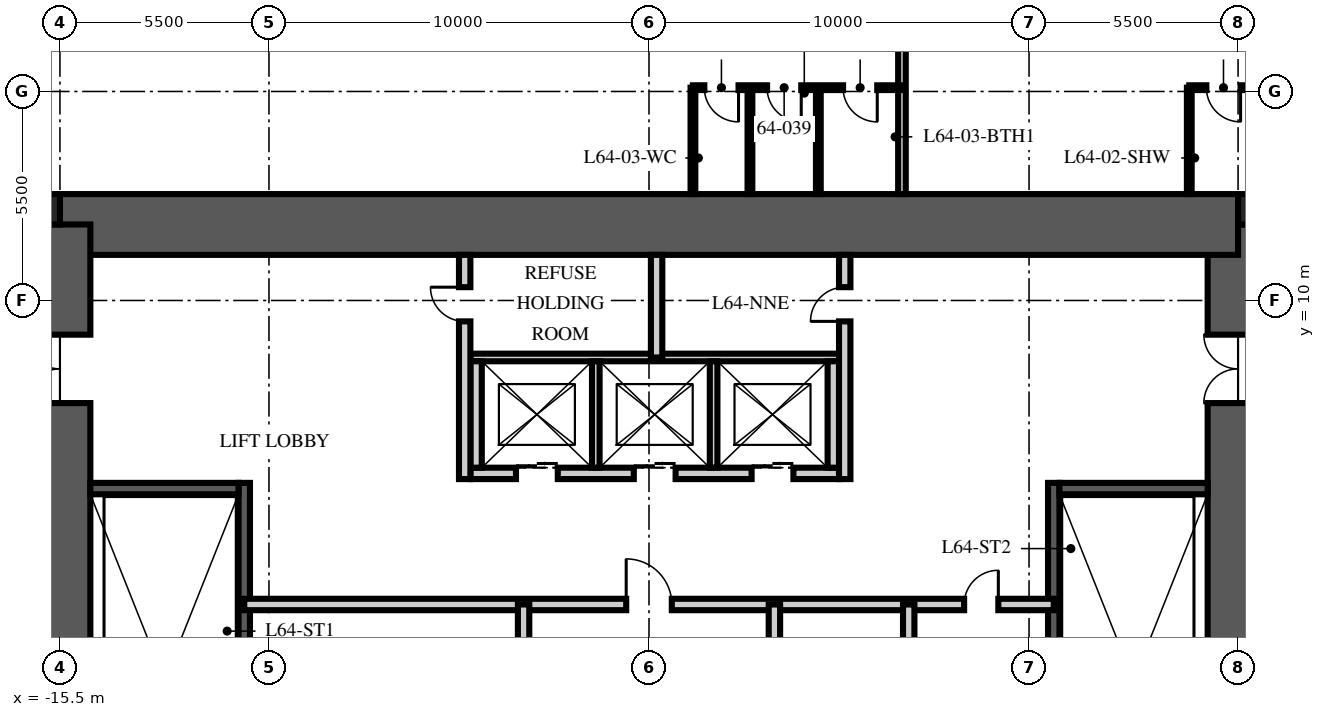
"""IFC4 building model, lengths in metres.
Left out: names, types, materials, properties, quantities, classifications, styles, units other than length and angle.
Written with IfcOpenShell. Run it as: python <this file> out.ifc"""

import sys

from ifc_helpers import new_model, si_unit, direction, frame, frame_2d, origin, origin_2d, place, context, subcontext, project, spatial, rectangle, extrude, element, fill, save


model = new_model("IFC4")
c1 = context("Model", 3, precision=1e-05, world=origin(), true_north=direction((0.0, 1.0)))
c2 = subcontext(c1, "Body", "Model", "MODEL_VIEW")
j1 = project(units=[si_unit("LENGTHUNIT", "METRE"), si_unit("PLANEANGLEUNIT", "RADIAN")], contexts=[c1])
p1 = place(None, origin())
s1 = spatial("IfcSite", under=j1, at=p1, CompositionType="ELEMENT")
p2 = place(p1, origin())
s2 = spatial("IfcBuilding", under=s1, at=p2, CompositionType="ELEMENT")
p3 = place(p2, frame((0.0, 0.0, 255.75)))
s3 = spatial("IfcBuildingStorey", under=s2, at=p3, CompositionType="ELEMENT", Elevation=255.75)
p4 = place(p3, frame((15.5, -12.0, -0.25), z_axis=(0.0, 0.0, 1.0), x_axis=(0.0, 1.0, 0.0)))
e1 = element("IfcWall", 1, at=p4, inside=s3, PredefinedType="SHEAR", context=c2, shape_type="SweptSolid", body=[
    extrude(rectangle(XDim=24.0, YDim=1.6, at=frame_2d((12.0, 0.0))), origin(), (0.0, 0.0, 1.0), 3.75),
])
p5 = place(p4, frame((3.2, 0.0, 0.25)))
e2 = element("IfcOpeningElement", 2, at=p5, cuts=e1, PredefinedType="OPENING", context=c2, shape_type="SweptSolid", body=[
    extrude(rectangle(XDim=1.2, YDim=2.1, at=frame_2d((0.6, 1.05))), frame((0.0, 0.81, 0.0), z_axis=(0.0, -1.0, 0.0), x_axis=(1.0, 0.0, 0.0)), (0.0, 0.0, 1.0), 1.62),
])
p6 = place(p4, frame((19.3, 0.0, 0.25)))
e3 = element("IfcOpeningElement", 3, at=p6, cuts=e1, PredefinedType="OPENING", context=c2, shape_type="SweptSolid", body=[
    extrude(rectangle(XDim=1.8, YDim=2.1, at=frame_2d((0.9, 1.05))), frame((0.0, 0.81, 0.0), z_axis=(0.0, -1.0, 0.0), x_axis=(1.0, 0.0, 0.0)), (0.0, 0.0, 1.0), 1.62),
])
p7 = place(p3, frame((-15.5, 12.0, -0.25), z_axis=(0.0, 0.0, 1.0), x_axis=(1.0, 0.0, 0.0)))
e4 = element("IfcWall", 4, at=p7, inside=s3, PredefinedType="SHEAR", context=c2, shape_type="SweptSolid", body=[
    extrude(rectangle(XDim=31.0, YDim=1.6, at=frame_2d((15.5, 0.0))), origin(), (0.0, 0.0, 1.0), 3.75),
])
p8 = place(p3, frame((-15.5, -12.0, -0.25), z_axis=(0.0, 0.0, 1.0), x_axis=(0.0, 1.0, 0.0)))
e5 = element("IfcWall", 5, at=p8, inside=s3, PredefinedType="SHEAR", context=c2, shape_type="SweptSolid", body=[
    extrude(rectangle(XDim=24.0, YDim=1.6, at=frame_2d((12.0, 0.0))), origin(), (0.0, 0.0, 1.0), 3.75),
])
p9 = place(p8, frame((3.2, 0.0, 0.25)))
e6 = element("IfcOpeningElement", 6, at=p9, cuts=e5, PredefinedType="OPENING", context=c2, shape_type="SweptSolid", body=[
    extrude(rectangle(XDim=1.2, YDim=2.1, at=frame_2d((0.6, 1.05))), frame((0.0, 0.81, 0.0), z_axis=(0.0, -1.0, 0.0), x_axis=(1.0, 0.0, 0.0)), (0.0, 0.0, 1.0), 1.62),
])
p10 = place(p8, frame((19.3, 0.0, 0.25)))
e7 = element("IfcOpeningElement", 7, at=p10, cuts=e5, PredefinedType="OPENING", context=c2, shape_type="SweptSolid", body=[
    extrude(rectangle(XDim=1.8, YDim=2.1, at=frame_2d((0.9, 1.05))), frame((0.0, 0.81, 0.0), z_axis=(0.0, -1.0, 0.0), x_axis=(1.0, 0.0, 0.0)), (0.0, 0.0, 1.0), 1.62),
])
for number, where, z_axis, x_axis in (
    (8, (15.9, 12.4, -0.25), (0.0, 0.0, 1.0), (1.0, 0.0, 0.0)),
    (9, (-15.9, 12.4, -0.25), (0.0, 0.0, 1.0), (1.0, 0.0, 0.0)),
):
    element("IfcColumn", number, at=place(p3, frame(where, z_axis=z_axis, x_axis=x_axis)), inside=s3, PredefinedType="COLUMN", context=c2, shape_type="SweptSolid", body=[
        extrude(rectangle(XDim=0.8, YDim=0.8, at=origin_2d()), origin(), (0.0, 0.0, 1.0), 3.75),
    ])
p11 = place(p3, frame((-10.65, -4.9, 0.0), z_axis=(0.0, 0.0, 1.0), x_axis=(0.0, 1.0, 0.0)))
e10 = element("IfcWall", 10, at=p11, inside=s3, PredefinedType="SOLIDWALL", context=c2, shape_type="SweptSolid", body=[
    extrude(rectangle(XDim=10.1, YDim=0.3, at=frame_2d((5.05, 0.0))), origin(), (0.0, 0.0, 1.0), 3.5),
])
p12 = place(p3, frame((-14.7, 5.05, 0.0), z_axis=(0.0, 0.0, 1.0), x_axis=(1.0, 0.0, 0.0)))
e11 = element("IfcWall", 11, at=p12, inside=s3, PredefinedType="SOLIDWALL", context=c2, shape_type="SweptSolid", body=[
    extrude(rectangle(XDim=3.9, YDim=0.3, at=frame_2d((1.95, 0.0))), origin(), (0.0, 0.0, 1.0), 3.5),
])
p13 = place(p3, frame((10.65, -4.9, 0.0), z_axis=(0.0, 0.0, 1.0), x_axis=(0.0, 1.0, 0.0)))
e12 = element("IfcWall", 12, at=p13, inside=s3, PredefinedType="SOLIDWALL", context=c2, shape_type="SweptSolid", body=[
    extrude(rectangle(XDim=10.1, YDim=0.3, at=frame_2d((5.05, 0.0))), origin(), (0.0, 0.0, 1.0), 3.5),
])
p14 = place(p3, frame((14.7, 5.05, 0.0), z_axis=(0.0, 0.0, 1.0), x_axis=(-1.0, 0.0, 0.0)))
e13 = element("IfcWall", 13, at=p14, inside=s3, PredefinedType="SOLIDWALL", context=c2, shape_type="SweptSolid", body=[
    extrude(rectangle(XDim=3.9, YDim=0.3, at=frame_2d((1.95, 0.0))), origin(), (0.0, 0.0, 1.0), 3.5),
])
p15 = place(p3, frame((-4.7, 5.45, 0.0), z_axis=(0.0, 0.0, 1.0), x_axis=(1.0, 0.0, 0.0)))
e14 = element("IfcWall", 14, at=p15, inside=s3, PredefinedType="PARTITIONING", context=c2, shape_type="SweptSolid", body=[
    extrude(rectangle(XDim=9.7, YDim=0.3, at=frame_2d((4.85, 0.0))), origin(), (0.0, 0.0, 1.0), 3.5),
])
p16 = place(p15, frame((1.2, 0.0, 0.0)))
e15 = element("IfcOpeningElement", 15, at=p16, cuts=e14, PredefinedType="OPENING", context=c2, shape_type="SweptSolid", body=[
    extrude(rectangle(XDim=1.1, YDim=2.1, at=frame_2d((0.55, 1.05))), frame((0.0, 0.16, 0.0), z_axis=(0.0, -1.0, 0.0), x_axis=(1.0, 0.0, 0.0)), (0.0, 0.0, 1.0), 0.32),
])
p17 = place(p15, frame((4.3, 0.0, 0.0)))
e16 = element("IfcOpeningElement", 16, at=p17, cuts=e14, PredefinedType="OPENING", context=c2, shape_type="SweptSolid", body=[
    extrude(rectangle(XDim=1.1, YDim=2.1, at=frame_2d((0.55, 1.05))), frame((0.0, 0.16, 0.0), z_axis=(0.0, -1.0, 0.0), x_axis=(1.0, 0.0, 0.0)), (0.0, 0.0, 1.0), 0.32),
])
p18 = place(p15, frame((7.4, 0.0, 0.0)))
e17 = element("IfcOpeningElement", 17, at=p18, cuts=e14, PredefinedType="OPENING", context=c2, shape_type="SweptSolid", body=[
    extrude(rectangle(XDim=1.1, YDim=2.1, at=frame_2d((0.55, 1.05))), frame((0.0, 0.16, 0.0), z_axis=(0.0, -1.0, 0.0), x_axis=(1.0, 0.0, 0.0)), (0.0, 0.0, 1.0), 0.32),
])
p19 = place(p3, frame((-4.7, 8.5, 0.0), z_axis=(0.0, 0.0, 1.0), x_axis=(1.0, 0.0, 0.0)))
e18 = element("IfcWall", 18, at=p19, inside=s3, PredefinedType="PARTITIONING", context=c2, shape_type="SweptSolid", body=[
    extrude(rectangle(XDim=9.7, YDim=0.2, at=frame_2d((4.85, 0.0))), origin(), (0.0, 0.0, 1.0), 3.5),
])
for number, where, z_axis, x_axis in (
    (19, (-4.55, 5.6, 0.0), (0.0, 0.0, 1.0), (0.0, 1.0, 0.0)),
    (20, (4.85, 5.6, 0.0), (0.0, 0.0, 1.0), (0.0, 1.0, 0.0)),
):
    element("IfcWall", number, at=place(p3, frame(where, z_axis=z_axis, x_axis=x_axis)), inside=s3, PredefinedType="PARTITIONING", context=c2, shape_type="SweptSolid", body=[
        extrude(rectangle(XDim=2.8, YDim=0.3, at=frame_2d((1.4, 0.0))), origin(), (0.0, 0.0, 1.0), 3.5),
    ])
for number, where, z_axis, x_axis in (
    (21, (-1.4, 5.6, 0.0), (0.0, 0.0, 1.0), (0.0, 1.0, 0.0)),
    (22, (1.7, 5.6, 0.0), (0.0, 0.0, 1.0), (0.0, 1.0, 0.0)),
):
    element("IfcWall", number, at=place(p3, frame(where, z_axis=z_axis, x_axis=x_axis)), inside=s3, PredefinedType="PARTITIONING", context=c2, shape_type="SweptSolid", body=[
        extrude(rectangle(XDim=2.8, YDim=0.2, at=frame_2d((1.4, 0.0))), origin(), (0.0, 0.0, 1.0), 3.5),
    ])
p20 = place(p3, frame((-10.65, 2.0, 0.0), z_axis=(0.0, 0.0, 1.0), x_axis=(1.0, 0.0, 0.0)))
e23 = element("IfcWall", 23, at=p20, inside=s3, PredefinedType="PARTITIONING", context=c2, shape_type="SweptSolid", body=[
    extrude(rectangle(XDim=21.3, YDim=0.3, at=frame_2d((10.65, 0.0))), origin(), (0.0, 0.0, 1.0), 3.5),
])
p21 = place(p20, frame((10.05, 0.0, 0.0)))
e24 = element("IfcOpeningElement", 24, at=p21, cuts=e23, PredefinedType="OPENING", context=c2, shape_type="SweptSolid", body=[
    extrude(rectangle(XDim=1.2, YDim=2.1, at=frame_2d((0.6, 1.05))), frame((0.0, 0.16, 0.0), z_axis=(0.0, -1.0, 0.0), x_axis=(1.0, 0.0, 0.0)), (0.0, 0.0, 1.0), 0.32),
])
p22 = place(p20, frame((18.942, 0.0, 0.0)))
e25 = element("IfcOpeningElement", 25, at=p22, cuts=e23, PredefinedType="OPENING", context=c2, shape_type="SweptSolid", body=[
    extrude(rectangle(XDim=0.9, YDim=2.1, at=frame_2d((0.45, 1.05))), frame((0.0, 0.16, 0.0), z_axis=(0.0, -1.0, 0.0), x_axis=(1.0, 0.0, 0.0)), (0.0, 0.0, 1.0), 0.32),
])
p23 = place(p3, frame((-3.3, -6.65, 0.0), z_axis=(0.0, 0.0, 1.0), x_axis=(0.0, 1.0, 0.0)))
e26 = element("IfcWall", 26, at=p23, inside=s3, PredefinedType="PARTITIONING", context=c2, shape_type="SweptSolid", body=[
    extrude(rectangle(XDim=8.65, YDim=0.3, at=frame_2d((4.325, 0.0))), origin(), (0.0, 0.0, 1.0), 3.5),
])
p24 = place(p23, frame((1.75, 0.0, 0.0)))
e27 = element("IfcOpeningElement", 27, at=p24, cuts=e26, PredefinedType="OPENING", context=c2, shape_type="SweptSolid", body=[
    extrude(rectangle(XDim=0.9, YDim=2.1, at=frame_2d((0.45, 1.05))), frame((0.0, 0.16, 0.0), z_axis=(0.0, -1.0, 0.0), x_axis=(1.0, 0.0, 0.0)), (0.0, 0.0, 1.0), 0.32),
])
p25 = place(p23, frame((6.075, 0.0, 0.0)))
e28 = element("IfcOpeningElement", 28, at=p25, cuts=e26, PredefinedType="OPENING", context=c2, shape_type="SweptSolid", body=[
    extrude(rectangle(XDim=0.9, YDim=2.1, at=frame_2d((0.45, 1.05))), frame((0.0, 0.16, 0.0), z_axis=(0.0, -1.0, 0.0), x_axis=(1.0, 0.0, 0.0)), (0.0, 0.0, 1.0), 0.32),
])
p26 = place(p3, frame((3.3, -6.65, 0.0), z_axis=(0.0, 0.0, 1.0), x_axis=(0.0, 1.0, 0.0)))
e29 = element("IfcWall", 29, at=p26, inside=s3, PredefinedType="PARTITIONING", context=c2, shape_type="SweptSolid", body=[
    extrude(rectangle(XDim=8.65, YDim=0.3, at=frame_2d((4.325, 0.0))), origin(), (0.0, 0.0, 1.0), 3.5),
])
p27 = place(p26, frame((3.875, 0.0, 0.0)))
e30 = element("IfcOpeningElement", 30, at=p27, cuts=e29, PredefinedType="OPENING", context=c2, shape_type="SweptSolid", body=[
    extrude(rectangle(XDim=0.9, YDim=2.1, at=frame_2d((0.45, 1.05))), frame((0.0, 0.16, 0.0), z_axis=(0.0, -1.0, 0.0), x_axis=(1.0, 0.0, 0.0)), (0.0, 0.0, 1.0), 0.32),
])
p28 = place(p3, frame((6.834, -6.65, 0.0), z_axis=(0.0, 0.0, 1.0), x_axis=(0.0, 1.0, 0.0)))
e31 = element("IfcWall", 31, at=p28, inside=s3, PredefinedType="PARTITIONING", context=c2, shape_type="SweptSolid", body=[
    extrude(rectangle(XDim=8.65, YDim=0.3, at=frame_2d((4.325, 0.0))), origin(), (0.0, 0.0, 1.0), 3.5),
])
p29 = place(p3, frame((-4.85, 5.3, 0.0), z_axis=(0.0, 0.0, 1.0), x_axis=(0.0, 1.0, 0.0)))
e32 = element("IfcWall", 32, at=p29, inside=s3, PredefinedType="PARTITIONING", context=c2, shape_type="SweptSolid", body=[
    extrude(rectangle(XDim=5.9, YDim=0.3, at=frame_2d((2.95, 0.0))), origin(), (0.0, 0.0, 1.0), 3.5),
])
p30 = place(p29, frame((4.15, 0.0, 0.0)))
e33 = element("IfcOpeningElement", 33, at=p30, cuts=e32, PredefinedType="OPENING", context=c2, shape_type="SweptSolid", body=[
    extrude(rectangle(XDim=0.9, YDim=2.1, at=frame_2d((0.45, 1.05))), frame((0.0, 0.16, 0.0), z_axis=(0.0, -1.0, 0.0), x_axis=(1.0, 0.0, 0.0)), (0.0, 0.0, 1.0), 0.32),
])
p31 = place(p3, frame((5.15, 5.3, 0.0), z_axis=(0.0, 0.0, 1.0), x_axis=(0.0, 1.0, 0.0)))
e34 = element("IfcWall", 34, at=p31, inside=s3, PredefinedType="PARTITIONING", context=c2, shape_type="SweptSolid", body=[
    extrude(rectangle(XDim=5.9, YDim=0.3, at=frame_2d((2.95, 0.0))), origin(), (0.0, 0.0, 1.0), 3.5),
])
p32 = place(p31, frame((4.15, 0.0, 0.0)))
e35 = element("IfcOpeningElement", 35, at=p32, cuts=e34, PredefinedType="OPENING", context=c2, shape_type="SweptSolid", body=[
    extrude(rectangle(XDim=0.9, YDim=2.1, at=frame_2d((0.45, 1.05))), frame((0.0, 0.16, 0.0), z_axis=(0.0, -1.0, 0.0), x_axis=(1.0, 0.0, 0.0)), (0.0, 0.0, 1.0), 0.32),
])
p33 = place(p3, frame((0.2, 8.5, 0.0), z_axis=(0.0, 0.0, 1.0), x_axis=(0.0, 1.0, 0.0)))
e36 = element("IfcWall", 36, at=p33, inside=s3, PredefinedType="PARTITIONING", context=c2, shape_type="SweptSolid", body=[
    extrude(rectangle(XDim=2.7, YDim=0.3, at=frame_2d((1.35, 0.0))), origin(), (0.0, 0.0, 1.0), 3.5),
])
p34 = place(p3, frame((6.656, 12.8, 0.0), z_axis=(0.0, 0.0, 1.0), x_axis=(0.0, 1.0, 0.0)))
e37 = element("IfcWall", 37, at=p34, inside=s3, PredefinedType="PARTITIONING", context=c2, shape_type="SweptSolid", body=[
    extrude(rectangle(XDim=12.9, YDim=0.2, at=frame_2d((6.45, 0.0))), origin(), (0.0, 0.0, 1.0), 2.91),
])
p35 = place(p3, frame((16.017, 15.6, 0.0), z_axis=(0.0, 0.0, 1.0), x_axis=(-1.0, 0.0, 0.0)))
e38 = element("IfcWall", 38, at=p35, inside=s3, PredefinedType="PARTITIONING", context=c2, shape_type="SweptSolid", body=[
    extrude(rectangle(XDim=1.8, YDim=0.125, at=frame_2d((0.9, 0.0))), origin(), (0.0, 0.0, 1.0), 3.5),
])
p36 = place(p35, frame((0.45, 0.0, 0.0)))
e39 = element("IfcOpeningElement", 39, at=p36, cuts=e38, PredefinedType="OPENING", context=c2, shape_type="SweptSolid", body=[
    extrude(rectangle(XDim=0.9, YDim=2.1, at=frame_2d((0.45, 1.05))), frame((0.0, 0.073, 0.0), z_axis=(0.0, -1.0, 0.0), x_axis=(1.0, 0.0, 0.0)), (0.0, 0.0, 1.0), 0.145),
])
p37 = place(p3, frame((14.217, 12.8, 0.0), z_axis=(0.0, 0.0, 1.0), x_axis=(0.0, 1.0, 0.0)))
e40 = element("IfcWall", 40, at=p37, inside=s3, PredefinedType="PARTITIONING", context=c2, shape_type="SweptSolid", body=[
    extrude(rectangle(XDim=2.8, YDim=0.125, at=frame_2d((1.4, 0.0))), origin(), (0.0, 0.0, 1.0), 3.5),
])
p38 = place(p3, frame((6.656, 15.6, 0.0), z_axis=(0.0, 0.0, 1.0), x_axis=(-1.0, 0.0, 0.0)))
e41 = element("IfcWall", 41, at=p38, inside=s3, PredefinedType="PARTITIONING", context=c2, shape_type="SweptSolid", body=[
    extrude(rectangle(XDim=5.5, YDim=0.125, at=frame_2d((2.75, 0.0))), origin(), (0.0, 0.0, 1.0), 2.81),
])
p39 = place(p38, frame((0.65, 0.0, 0.0)))
e42 = element("IfcOpeningElement", 42, at=p39, cuts=e41, PredefinedType="OPENING", context=c2, shape_type="SweptSolid", body=[
    extrude(rectangle(XDim=0.9, YDim=2.1, at=frame_2d((0.45, 1.05))), frame((0.0, 0.073, 0.0), z_axis=(0.0, -1.0, 0.0), x_axis=(1.0, 0.0, 0.0)), (0.0, 0.0, 1.0), 0.145),
])
p40 = place(p38, frame((2.65, 0.0, 0.0)))
e43 = element("IfcOpeningElement", 43, at=p40, cuts=e41, PredefinedType="OPENING", context=c2, shape_type="SweptSolid", body=[
    extrude(rectangle(XDim=0.9, YDim=2.1, at=frame_2d((0.45, 1.05))), frame((0.0, 0.073, 0.0), z_axis=(0.0, -1.0, 0.0), x_axis=(1.0, 0.0, 0.0)), (0.0, 0.0, 1.0), 0.145),
])
p41 = place(p38, frame((4.3, 0.0, 0.0)))
e44 = element("IfcOpeningElement", 44, at=p41, cuts=e41, PredefinedType="OPENING", context=c2, shape_type="SweptSolid", body=[
    extrude(rectangle(XDim=0.9, YDim=2.1, at=frame_2d((0.45, 1.05))), frame((0.0, 0.073, 0.0), z_axis=(0.0, -1.0, 0.0), x_axis=(1.0, 0.0, 0.0)), (0.0, 0.0, 1.0), 0.145),
])
for number, where, z_axis, x_axis in (
    (45, (4.456, 12.8, 0.0), (0.0, 0.0, 1.0), (0.0, 1.0, 0.0)),
    (46, (2.656, 12.8, 0.0), (0.0, 0.0, 1.0), (0.0, 1.0, 0.0)),
    (47, (1.156, 12.8, 0.0), (0.0, 0.0, 1.0), (0.0, 1.0, 0.0)),
):
    element("IfcWall", number, at=place(p3, frame(where, z_axis=z_axis, x_axis=x_axis)), inside=s3, PredefinedType="PARTITIONING", context=c2, shape_type="SweptSolid", body=[
        extrude(rectangle(XDim=2.8, YDim=0.125, at=frame_2d((1.4, 0.0))), origin(), (0.0, 0.0, 1.0), 3.5),
    ])
p42 = place(p10, origin())
e48 = element("IfcDoor", 48, at=p42, inside=s3, OperationType="DOUBLE_DOOR_SINGLE_SWING", PredefinedType="DOOR", context=c2, shape_type="SweptSolid", body=[
    extrude(rectangle(XDim=1.8, YDim=2.1, at=frame_2d((0.9, 1.05))), frame((0.0, 0.025, 0.0), z_axis=(0.0, -1.0, 0.0), x_axis=(1.0, 0.0, 0.0)), (0.0, 0.0, 1.0), 0.05),
])
fill(e7, e48)
p43 = place(p6, origin())
e49 = element("IfcDoor", 49, at=p43, inside=s3, OperationType="DOUBLE_DOOR_SINGLE_SWING", PredefinedType="DOOR", context=c2, shape_type="SweptSolid", body=[
    extrude(rectangle(XDim=1.8, YDim=2.1, at=frame_2d((0.9, 1.05))), frame((0.0, 0.025, 0.0), z_axis=(0.0, -1.0, 0.0), x_axis=(1.0, 0.0, 0.0)), (0.0, 0.0, 1.0), 0.05),
])
fill(e3, e49)
p44 = place(p16, origin())
e50 = element("IfcDoor", 50, at=p44, inside=s3, OperationType="DOUBLE_DOOR_SLIDING", PredefinedType="DOOR", context=c2, shape_type="SweptSolid", body=[
    extrude(rectangle(XDim=1.1, YDim=2.1, at=frame_2d((0.55, 1.05))), frame((0.0, 0.025, 0.0), z_axis=(0.0, -1.0, 0.0), x_axis=(1.0, 0.0, 0.0)), (0.0, 0.0, 1.0), 0.05),
])
fill(e15, e50)
p45 = place(p17, origin())
e51 = element("IfcDoor", 51, at=p45, inside=s3, OperationType="DOUBLE_DOOR_SLIDING", PredefinedType="DOOR", context=c2, shape_type="SweptSolid", body=[
    extrude(rectangle(XDim=1.1, YDim=2.1, at=frame_2d((0.55, 1.05))), frame((0.0, 0.025, 0.0), z_axis=(0.0, -1.0, 0.0), x_axis=(1.0, 0.0, 0.0)), (0.0, 0.0, 1.0), 0.05),
])
fill(e16, e51)
p46 = place(p18, origin())
e52 = element("IfcDoor", 52, at=p46, inside=s3, OperationType="DOUBLE_DOOR_SLIDING", PredefinedType="DOOR", context=c2, shape_type="SweptSolid", body=[
    extrude(rectangle(XDim=1.1, YDim=2.1, at=frame_2d((0.55, 1.05))), frame((0.0, 0.025, 0.0), z_axis=(0.0, -1.0, 0.0), x_axis=(1.0, 0.0, 0.0)), (0.0, 0.0, 1.0), 0.05),
])
fill(e17, e52)
p47 = place(p21, origin())
e53 = element("IfcDoor", 53, at=p47, inside=s3, OperationType="SINGLE_SWING_LEFT", PredefinedType="DOOR", context=c2, shape_type="SweptSolid", body=[
    extrude(rectangle(XDim=1.2, YDim=2.1, at=frame_2d((0.6, 1.05))), frame((0.0, 0.025, 0.0), z_axis=(0.0, -1.0, 0.0), x_axis=(1.0, 0.0, 0.0)), (0.0, 0.0, 1.0), 0.05),
])
fill(e24, e53)
p48 = place(p22, origin())
e54 = element("IfcDoor", 54, at=p48, inside=s3, OperationType="SINGLE_SWING_RIGHT", PredefinedType="DOOR", context=c2, shape_type="SweptSolid", body=[
    extrude(rectangle(XDim=0.9, YDim=2.1, at=frame_2d((0.45, 1.05))), frame((0.0, 0.025, 0.0), z_axis=(0.0, -1.0, 0.0), x_axis=(1.0, 0.0, 0.0)), (0.0, 0.0, 1.0), 0.05),
])
fill(e25, e54)
p49 = place(p30, origin())
e55 = element("IfcDoor", 55, at=p49, inside=s3, OperationType="SINGLE_SWING_RIGHT", PredefinedType="DOOR", context=c2, shape_type="SweptSolid", body=[
    extrude(rectangle(XDim=0.9, YDim=2.1, at=frame_2d((0.45, 1.05))), frame((0.0, 0.025, 0.0), z_axis=(0.0, -1.0, 0.0), x_axis=(1.0, 0.0, 0.0)), (0.0, 0.0, 1.0), 0.05),
])
fill(e33, e55)
p50 = place(p32, origin())
e56 = element("IfcDoor", 56, at=p50, inside=s3, OperationType="SINGLE_SWING_LEFT", PredefinedType="DOOR", context=c2, shape_type="SweptSolid", body=[
    extrude(rectangle(XDim=0.9, YDim=2.1, at=frame_2d((0.45, 1.05))), frame((0.0, 0.025, 0.0), z_axis=(0.0, -1.0, 0.0), x_axis=(1.0, 0.0, 0.0)), (0.0, 0.0, 1.0), 0.05),
])
fill(e35, e56)
p51 = place(p36, origin())
e57 = element("IfcDoor", 57, at=p51, inside=s3, OperationType="SINGLE_SWING_LEFT", PredefinedType="DOOR", context=c2, shape_type="SweptSolid", body=[
    extrude(rectangle(XDim=0.9, YDim=2.1, at=frame_2d((0.45, 1.05))), frame((0.0, 0.025, 0.0), z_axis=(0.0, -1.0, 0.0), x_axis=(1.0, 0.0, 0.0)), (0.0, 0.0, 1.0), 0.05),
])
fill(e39, e57)
p52 = place(p39, origin())
e58 = element("IfcDoor", 58, at=p52, inside=s3, OperationType="SINGLE_SWING_LEFT", PredefinedType="DOOR", context=c2, shape_type="SweptSolid", body=[
    extrude(rectangle(XDim=0.9, YDim=2.1, at=frame_2d((0.45, 1.05))), frame((0.0, 0.025, 0.0), z_axis=(0.0, -1.0, 0.0), x_axis=(1.0, 0.0, 0.0)), (0.0, 0.0, 1.0), 0.05),
])
fill(e42, e58)
p53 = place(p40, origin())
e59 = element("IfcDoor", 59, at=p53, inside=s3, OperationType="SINGLE_SWING_LEFT", PredefinedType="DOOR", context=c2, shape_type="SweptSolid", body=[
    extrude(rectangle(XDim=0.9, YDim=2.1, at=frame_2d((0.45, 1.05))), frame((0.0, 0.025, 0.0), z_axis=(0.0, -1.0, 0.0), x_axis=(1.0, 0.0, 0.0)), (0.0, 0.0, 1.0), 0.05),
])
fill(e43, e59)
p54 = place(p41, origin())
e60 = element("IfcDoor", 60, at=p54, inside=s3, OperationType="SINGLE_SWING_LEFT", PredefinedType="DOOR", context=c2, shape_type="SweptSolid", body=[
    extrude(rectangle(XDim=0.9, YDim=2.1, at=frame_2d((0.45, 1.05))), frame((0.0, 0.025, 0.0), z_axis=(0.0, -1.0, 0.0), x_axis=(1.0, 0.0, 0.0)), (0.0, 0.0, 1.0), 0.05),
])
fill(e44, e60)
save(model, sys.argv[1])
